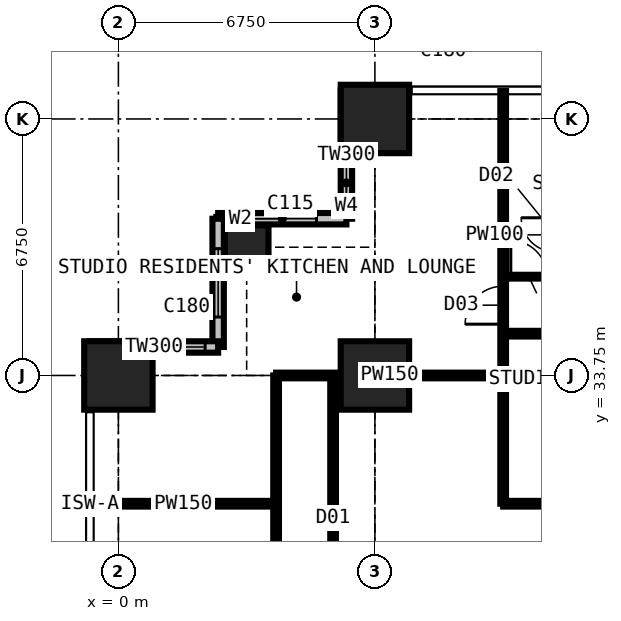
"""IFC4 building model, lengths in metres.
Left out: names, types, materials, properties, quantities, classifications, styles, units other than length and angle.
Written with IfcOpenShell. Run it as: python <this file> out.ifc"""

import sys

from ifc_helpers import new_model, si_unit, direction, frame, frame_2d, origin, origin_2d, place, context, subcontext, project, spatial, rectangle, extrude, element, fill, save


model = new_model("IFC4")
c1 = context("Model", 3, precision=1e-05, world=origin(), true_north=direction((0.0, 1.0)))
c2 = subcontext(c1, "Body", "Model", "MODEL_VIEW")
j1 = project(units=[si_unit("LENGTHUNIT", "METRE"), si_unit("PLANEANGLEUNIT", "RADIAN")], contexts=[c1])
p1 = place(None, origin())
s1 = spatial("IfcSite", under=j1, at=p1, CompositionType="ELEMENT")
p2 = place(p1, origin())
s2 = spatial("IfcBuilding", under=s1, at=p2, CompositionType="ELEMENT")
p3 = place(p2, frame((0.0, 0.0, 64.8)))
s3 = spatial("IfcBuildingStorey", under=s2, at=p3, CompositionType="ELEMENT", Elevation=64.8)
p4 = place(p3, frame((0.0, 33.75, 0.0), z_axis=(0.0, 0.0, 1.0), x_axis=(1.0, 0.0, 0.0)))
e1 = element("IfcColumn", 1, at=p4, inside=s3, PredefinedType="COLUMN", context=c2, shape_type="SweptSolid", body=[
    extrude(rectangle(XDim=1.8, YDim=1.8, at=origin_2d()), origin(), (0.0, 0.0, 1.0), 3.6),
])
p5 = place(p3, frame((3.375, 37.125, 0.0), z_axis=(0.0, 0.0, 1.0), x_axis=(1.0, 0.0, 0.0)))
e2 = element("IfcColumn", 2, at=p5, inside=s3, PredefinedType="COLUMN", context=c2, shape_type="SweptSolid", body=[
    extrude(rectangle(XDim=1.15, YDim=1.15, at=origin_2d()), origin(), (0.0, 0.0, 1.0), 3.6),
])
for number, where, z_axis, x_axis in (
    (3, (6.75, 33.75, 0.0), (0.0, 0.0, 1.0), (1.0, 0.0, 0.0)),
    (4, (6.75, 40.5, 0.0), (0.0, 0.0, 1.0), (1.0, 0.0, 0.0)),
):
    element("IfcColumn", number, at=place(p3, frame(where, z_axis=z_axis, x_axis=x_axis)), inside=s3, PredefinedType="COLUMN", context=c2, shape_type="SweptSolid", body=[
        extrude(rectangle(XDim=1.8, YDim=1.8, at=origin_2d()), origin(), (0.0, 0.0, 1.0), 3.6),
    ])
p6 = place(p3, frame((6.0, 41.25, 0.0), z_axis=(0.0, 0.0, 1.0), x_axis=(0.0, -1.0, 0.0)))
e5 = element("IfcWall", 5, at=p6, inside=s3, PredefinedType="SOLIDWALL", context=c2, shape_type="SweptSolid", body=[
    extrude(rectangle(XDim=3.375, YDim=0.3, at=frame_2d((1.688, 0.0))), origin(), (0.0, 0.0, 1.0), 3.375),
])
p7 = place(p6, frame((1.833, 0.0, 0.9)))
e6 = element("IfcOpeningElement", 6, at=p7, cuts=e5, PredefinedType="OPENING", context=c2, shape_type="SweptSolid", body=[
    extrude(rectangle(XDim=1.2, YDim=1.8, at=frame_2d((0.6, 0.9))), frame((0.0, 0.16, 0.0), z_axis=(0.0, -1.0, 0.0), x_axis=(1.0, 0.0, 0.0)), (0.0, 0.0, 1.0), 0.32),
])
p8 = place(p3, frame((6.0, 37.875, 0.0), z_axis=(0.0, 0.0, 1.0), x_axis=(-1.0, 0.0, 0.0)))
e7 = element("IfcWall", 7, at=p8, inside=s3, PredefinedType="SOLIDWALL", context=c2, shape_type="SweptSolid", body=[
    extrude(rectangle(XDim=3.375, YDim=0.3, at=frame_2d((1.688, 0.0))), origin(), (0.0, 0.0, 1.0), 3.375),
])
p9 = place(p8, frame((0.788, 0.0, 0.6)))
e8 = element("IfcOpeningElement", 8, at=p9, cuts=e7, PredefinedType="OPENING", context=c2, shape_type="SweptSolid", body=[
    extrude(rectangle(XDim=1.8, YDim=2.1, at=frame_2d((0.9, 1.05))), frame((0.0, 0.16, 0.0), z_axis=(0.0, -1.0, 0.0), x_axis=(1.0, 0.0, 0.0)), (0.0, 0.0, 1.0), 0.32),
])
p10 = place(p3, frame((2.625, 37.875, 0.0), z_axis=(0.0, 0.0, 1.0), x_axis=(0.0, -1.0, 0.0)))
e9 = element("IfcWall", 9, at=p10, inside=s3, PredefinedType="SOLIDWALL", context=c2, shape_type="SweptSolid", body=[
    extrude(rectangle(XDim=3.375, YDim=0.3, at=frame_2d((1.688, 0.0))), origin(), (0.0, 0.0, 1.0), 3.375),
])
p11 = place(p10, frame((0.788, 0.0, 0.6)))
e10 = element("IfcOpeningElement", 10, at=p11, cuts=e9, PredefinedType="OPENING", context=c2, shape_type="SweptSolid", body=[
    extrude(rectangle(XDim=1.8, YDim=2.1, at=frame_2d((0.9, 1.05))), frame((0.0, 0.16, 0.0), z_axis=(0.0, -1.0, 0.0), x_axis=(1.0, 0.0, 0.0)), (0.0, 0.0, 1.0), 0.32),
])
p12 = place(p3, frame((2.625, 34.5, 0.0), z_axis=(0.0, 0.0, 1.0), x_axis=(-1.0, 0.0, 0.0)))
e11 = element("IfcWall", 11, at=p12, inside=s3, PredefinedType="SOLIDWALL", context=c2, shape_type="SweptSolid", body=[
    extrude(rectangle(XDim=3.375, YDim=0.3, at=frame_2d((1.688, 0.0))), origin(), (0.0, 0.0, 1.0), 3.375),
])
p13 = place(p12, frame((0.343, 0.0, 0.9)))
e12 = element("IfcOpeningElement", 12, at=p13, cuts=e11, PredefinedType="OPENING", context=c2, shape_type="SweptSolid", body=[
    extrude(rectangle(XDim=1.2, YDim=1.8, at=frame_2d((0.6, 0.9))), frame((0.0, 0.16, 0.0), z_axis=(0.0, -1.0, 0.0), x_axis=(1.0, 0.0, 0.0)), (0.0, 0.0, 1.0), 0.32),
])
p14 = place(p3, frame((-0.734, 30.375, 0.0), z_axis=(0.0, 0.0, 1.0), x_axis=(1.0, 0.0, 0.0)))
e13 = element("IfcWall", 13, at=p14, inside=s3, PredefinedType="PARTITIONING", context=c2, shape_type="SweptSolid", body=[
    extrude(rectangle(XDim=4.884, YDim=0.15, at=frame_2d((2.442, 0.0))), origin(), (0.0, 0.0, 1.0), 3.375),
])
p15 = place(p3, frame((4.15, 10.125, 0.0), z_axis=(0.0, 0.0, 1.0), x_axis=(0.0, 1.0, 0.0)))
e14 = element("IfcWall", 14, at=p15, inside=s3, PredefinedType="PARTITIONING", context=c2, shape_type="SweptSolid", body=[
    extrude(rectangle(XDim=23.625, YDim=0.15, at=frame_2d((11.812, 0.0))), origin(), (0.0, 0.0, 1.0), 3.375),
])
p16 = place(p15, frame((4.2, 0.0, 0.0)))
e15 = element("IfcOpeningElement", 15, at=p16, cuts=e14, PredefinedType="OPENING", context=c2, shape_type="SweptSolid", body=[
    extrude(rectangle(XDim=0.95, YDim=2.2, at=frame_2d((0.475, 1.1))), frame((0.0, 0.085, 0.0), z_axis=(0.0, -1.0, 0.0), x_axis=(1.0, 0.0, 0.0)), (0.0, 0.0, 1.0), 0.17),
])
p17 = place(p15, frame((10.95, 0.0, 0.0)))
e16 = element("IfcOpeningElement", 16, at=p17, cuts=e14, PredefinedType="OPENING", context=c2, shape_type="SweptSolid", body=[
    extrude(rectangle(XDim=0.95, YDim=2.2, at=frame_2d((0.475, 1.1))), frame((0.0, 0.085, 0.0), z_axis=(0.0, -1.0, 0.0), x_axis=(1.0, 0.0, 0.0)), (0.0, 0.0, 1.0), 0.17),
])
p18 = place(p15, frame((17.7, 0.0, 0.0)))
e17 = element("IfcOpeningElement", 17, at=p18, cuts=e14, PredefinedType="OPENING", context=c2, shape_type="SweptSolid", body=[
    extrude(rectangle(XDim=0.95, YDim=2.2, at=frame_2d((0.475, 1.1))), frame((0.0, 0.085, 0.0), z_axis=(0.0, -1.0, 0.0), x_axis=(1.0, 0.0, 0.0)), (0.0, 0.0, 1.0), 0.17),
])
p19 = place(p3, frame((4.15, 33.75, 0.0), z_axis=(0.0, 0.0, 1.0), x_axis=(1.0, 0.0, 0.0)))
e18 = element("IfcWall", 18, at=p19, inside=s3, PredefinedType="PARTITIONING", context=c2, shape_type="SweptSolid", body=[
    extrude(rectangle(XDim=5.975, YDim=0.15, at=frame_2d((2.988, 0.0))), origin(), (0.0, 0.0, 1.0), 2.877),
])
p20 = place(p3, frame((5.65, 22.988, 0.0), z_axis=(0.0, 0.0, 1.0), x_axis=(0.0, 1.0, 0.0)))
e19 = element("IfcWall", 19, at=p20, inside=s3, PredefinedType="PARTITIONING", context=c2, shape_type="SweptSolid", body=[
    extrude(rectangle(XDim=10.762, YDim=0.15, at=frame_2d((5.381, 0.0))), origin(), (0.0, 0.0, 1.0), 3.375),
])
p21 = place(p20, frame((4.95, 0.0, 0.0)))
e20 = element("IfcOpeningElement", 20, at=p21, cuts=e19, PredefinedType="OPENING", context=c2, shape_type="SweptSolid", body=[
    extrude(rectangle(XDim=0.95, YDim=2.2, at=frame_2d((0.475, 1.1))), frame((0.0, 0.085, 0.0), z_axis=(0.0, -1.0, 0.0), x_axis=(1.0, 0.0, 0.0)), (0.0, 0.0, 1.0), 0.17),
])
p22 = place(p3, frame((10.125, 30.375, 0.0), z_axis=(0.0, 0.0, 1.0), x_axis=(0.0, 1.0, 0.0)))
e21 = element("IfcWall", 21, at=p22, inside=s3, PredefinedType="PARTITIONING", context=c2, shape_type="SweptSolid", body=[
    extrude(rectangle(XDim=10.859, YDim=0.15, at=frame_2d((5.429, 0.0))), origin(), (0.0, 0.0, 1.0), 3.375),
])
p23 = place(p22, frame((4.725, 0.0, 0.0)))
e22 = element("IfcOpeningElement", 22, at=p23, cuts=e21, PredefinedType="OPENING", context=c2, shape_type="SweptSolid", body=[
    extrude(rectangle(XDim=1.0, YDim=2.2, at=frame_2d((0.5, 1.1))), frame((0.0, 0.085, 0.0), z_axis=(0.0, -1.0, 0.0), x_axis=(1.0, 0.0, 0.0)), (0.0, 0.0, 1.0), 0.17),
])
p24 = place(p3, frame((10.125, 30.375, 0.0), z_axis=(0.0, 0.0, 1.0), x_axis=(1.0, 0.0, 0.0)))
e23 = element("IfcWall", 23, at=p24, inside=s3, PredefinedType="PARTITIONING", context=c2, shape_type="SweptSolid", body=[
    extrude(rectangle(XDim=1.175, YDim=0.15, at=frame_2d((0.587, 0.0))), origin(), (0.0, 0.0, 1.0), 3.375),
])
p25 = place(p3, frame((10.125, 34.85, 0.0), z_axis=(0.0, 0.0, 1.0), x_axis=(1.0, 0.0, 0.0)))
e24 = element("IfcWall", 24, at=p25, inside=s3, PredefinedType="PARTITIONING", context=c2, shape_type="SweptSolid", body=[
    extrude(rectangle(XDim=10.762, YDim=0.15, at=frame_2d((5.381, 0.0))), origin(), (0.0, 0.0, 1.0), 3.375),
])
p26 = place(p25, frame((4.9, 0.0, 0.0)))
e25 = element("IfcOpeningElement", 25, at=p26, cuts=e24, PredefinedType="OPENING", context=c2, shape_type="SweptSolid", body=[
    extrude(rectangle(XDim=0.95, YDim=2.2, at=frame_2d((0.475, 1.1))), frame((0.0, 0.085, 0.0), z_axis=(0.0, -1.0, 0.0), x_axis=(1.0, 0.0, 0.0)), (0.0, 0.0, 1.0), 0.17),
])
p27 = place(p3, frame((10.125, 36.35, 0.0), z_axis=(0.0, 0.0, 1.0), x_axis=(1.0, 0.0, 0.0)))
e26 = element("IfcWall", 26, at=p27, inside=s3, PredefinedType="PARTITIONING", context=c2, shape_type="SweptSolid", body=[
    extrude(rectangle(XDim=23.625, YDim=0.1, at=frame_2d((11.812, 0.0))), origin(), (0.0, 0.0, 1.0), 3.375),
])
p28 = place(p27, frame((0.2, 0.0, 0.0)))
e27 = element("IfcOpeningElement", 27, at=p28, cuts=e26, PredefinedType="OPENING", context=c2, shape_type="SweptSolid", body=[
    extrude(rectangle(XDim=0.95, YDim=2.2, at=frame_2d((0.475, 1.1))), frame((0.0, 0.06, 0.0), z_axis=(0.0, -1.0, 0.0), x_axis=(1.0, 0.0, 0.0)), (0.0, 0.0, 1.0), 0.12),
])
p29 = place(p27, frame((3.625, 0.0, 0.0)))
e28 = element("IfcOpeningElement", 28, at=p29, cuts=e26, PredefinedType="OPENING", context=c2, shape_type="SweptSolid", body=[
    extrude(rectangle(XDim=0.95, YDim=2.2, at=frame_2d((0.475, 1.1))), frame((0.0, 0.06, 0.0), z_axis=(0.0, -1.0, 0.0), x_axis=(1.0, 0.0, 0.0)), (0.0, 0.0, 1.0), 0.12),
])
p30 = place(p27, frame((7.0, 0.0, 0.0)))
e29 = element("IfcOpeningElement", 29, at=p30, cuts=e26, PredefinedType="OPENING", context=c2, shape_type="SweptSolid", body=[
    extrude(rectangle(XDim=0.95, YDim=2.2, at=frame_2d((0.475, 1.1))), frame((0.0, 0.06, 0.0), z_axis=(0.0, -1.0, 0.0), x_axis=(1.0, 0.0, 0.0)), (0.0, 0.0, 1.0), 0.12),
])
p31 = place(p27, frame((10.375, 0.0, 0.0)))
e30 = element("IfcOpeningElement", 30, at=p31, cuts=e26, PredefinedType="OPENING", context=c2, shape_type="SweptSolid", body=[
    extrude(rectangle(XDim=0.95, YDim=2.2, at=frame_2d((0.475, 1.1))), frame((0.0, 0.06, 0.0), z_axis=(0.0, -1.0, 0.0), x_axis=(1.0, 0.0, 0.0)), (0.0, 0.0, 1.0), 0.12),
])
p32 = place(p27, frame((13.75, 0.0, 0.0)))
e31 = element("IfcOpeningElement", 31, at=p32, cuts=e26, PredefinedType="OPENING", context=c2, shape_type="SweptSolid", body=[
    extrude(rectangle(XDim=0.95, YDim=2.2, at=frame_2d((0.475, 1.1))), frame((0.0, 0.06, 0.0), z_axis=(0.0, -1.0, 0.0), x_axis=(1.0, 0.0, 0.0)), (0.0, 0.0, 1.0), 0.12),
])
p33 = place(p7, origin())
e32 = element("IfcWindow", 32, at=p33, inside=s3, PartitioningType="SINGLE_PANEL", PredefinedType="WINDOW", context=c2, shape_type="SweptSolid", body=[
    extrude(rectangle(XDim=1.2, YDim=1.8, at=frame_2d((0.6, 0.9))), frame((0.0, 0.03, 0.0), z_axis=(0.0, -1.0, 0.0), x_axis=(1.0, 0.0, 0.0)), (0.0, 0.0, 1.0), 0.06),
])
fill(e6, e32)
p34 = place(p9, origin())
e33 = element("IfcWindow", 33, at=p34, inside=s3, PartitioningType="SINGLE_PANEL", PredefinedType="WINDOW", context=c2, shape_type="SweptSolid", body=[
    extrude(rectangle(XDim=1.8, YDim=2.1, at=frame_2d((0.9, 1.05))), frame((0.0, 0.03, 0.0), z_axis=(0.0, -1.0, 0.0), x_axis=(1.0, 0.0, 0.0)), (0.0, 0.0, 1.0), 0.06),
])
fill(e8, e33)
p35 = place(p11, origin())
e34 = element("IfcWindow", 34, at=p35, inside=s3, PartitioningType="SINGLE_PANEL", PredefinedType="WINDOW", context=c2, shape_type="SweptSolid", body=[
    extrude(rectangle(XDim=1.8, YDim=2.1, at=frame_2d((0.9, 1.05))), frame((0.0, 0.03, 0.0), z_axis=(0.0, -1.0, 0.0), x_axis=(1.0, 0.0, 0.0)), (0.0, 0.0, 1.0), 0.06),
])
fill(e10, e34)
p36 = place(p13, origin())
e35 = element("IfcWindow", 35, at=p36, inside=s3, PartitioningType="SINGLE_PANEL", PredefinedType="WINDOW", context=c2, shape_type="SweptSolid", body=[
    extrude(rectangle(XDim=1.2, YDim=1.8, at=frame_2d((0.6, 0.9))), frame((0.0, 0.03, 0.0), z_axis=(0.0, -1.0, 0.0), x_axis=(1.0, 0.0, 0.0)), (0.0, 0.0, 1.0), 0.06),
])
fill(e12, e35)
p37 = place(p28, origin())
e36 = element("IfcDoor", 36, at=p37, inside=s3, OperationType="SINGLE_SWING_LEFT", PredefinedType="DOOR", context=c2, shape_type="SweptSolid", body=[
    extrude(rectangle(XDim=0.95, YDim=2.2, at=frame_2d((0.475, 1.1))), frame((0.0, 0.025, 0.0), z_axis=(0.0, -1.0, 0.0), x_axis=(1.0, 0.0, 0.0)), (0.0, 0.0, 1.0), 0.05),
])
fill(e27, e36)
p38 = place(p23, origin())
e37 = element("IfcDoor", 37, at=p38, inside=s3, OperationType="SINGLE_SWING_LEFT", PredefinedType="DOOR", context=c2, shape_type="SweptSolid", body=[
    extrude(rectangle(XDim=1.0, YDim=2.2, at=frame_2d((0.5, 1.1))), frame((0.0, 0.025, 0.0), z_axis=(0.0, -1.0, 0.0), x_axis=(1.0, 0.0, 0.0)), (0.0, 0.0, 1.0), 0.05),
])
fill(e22, e37)
save(model, sys.argv[1])
